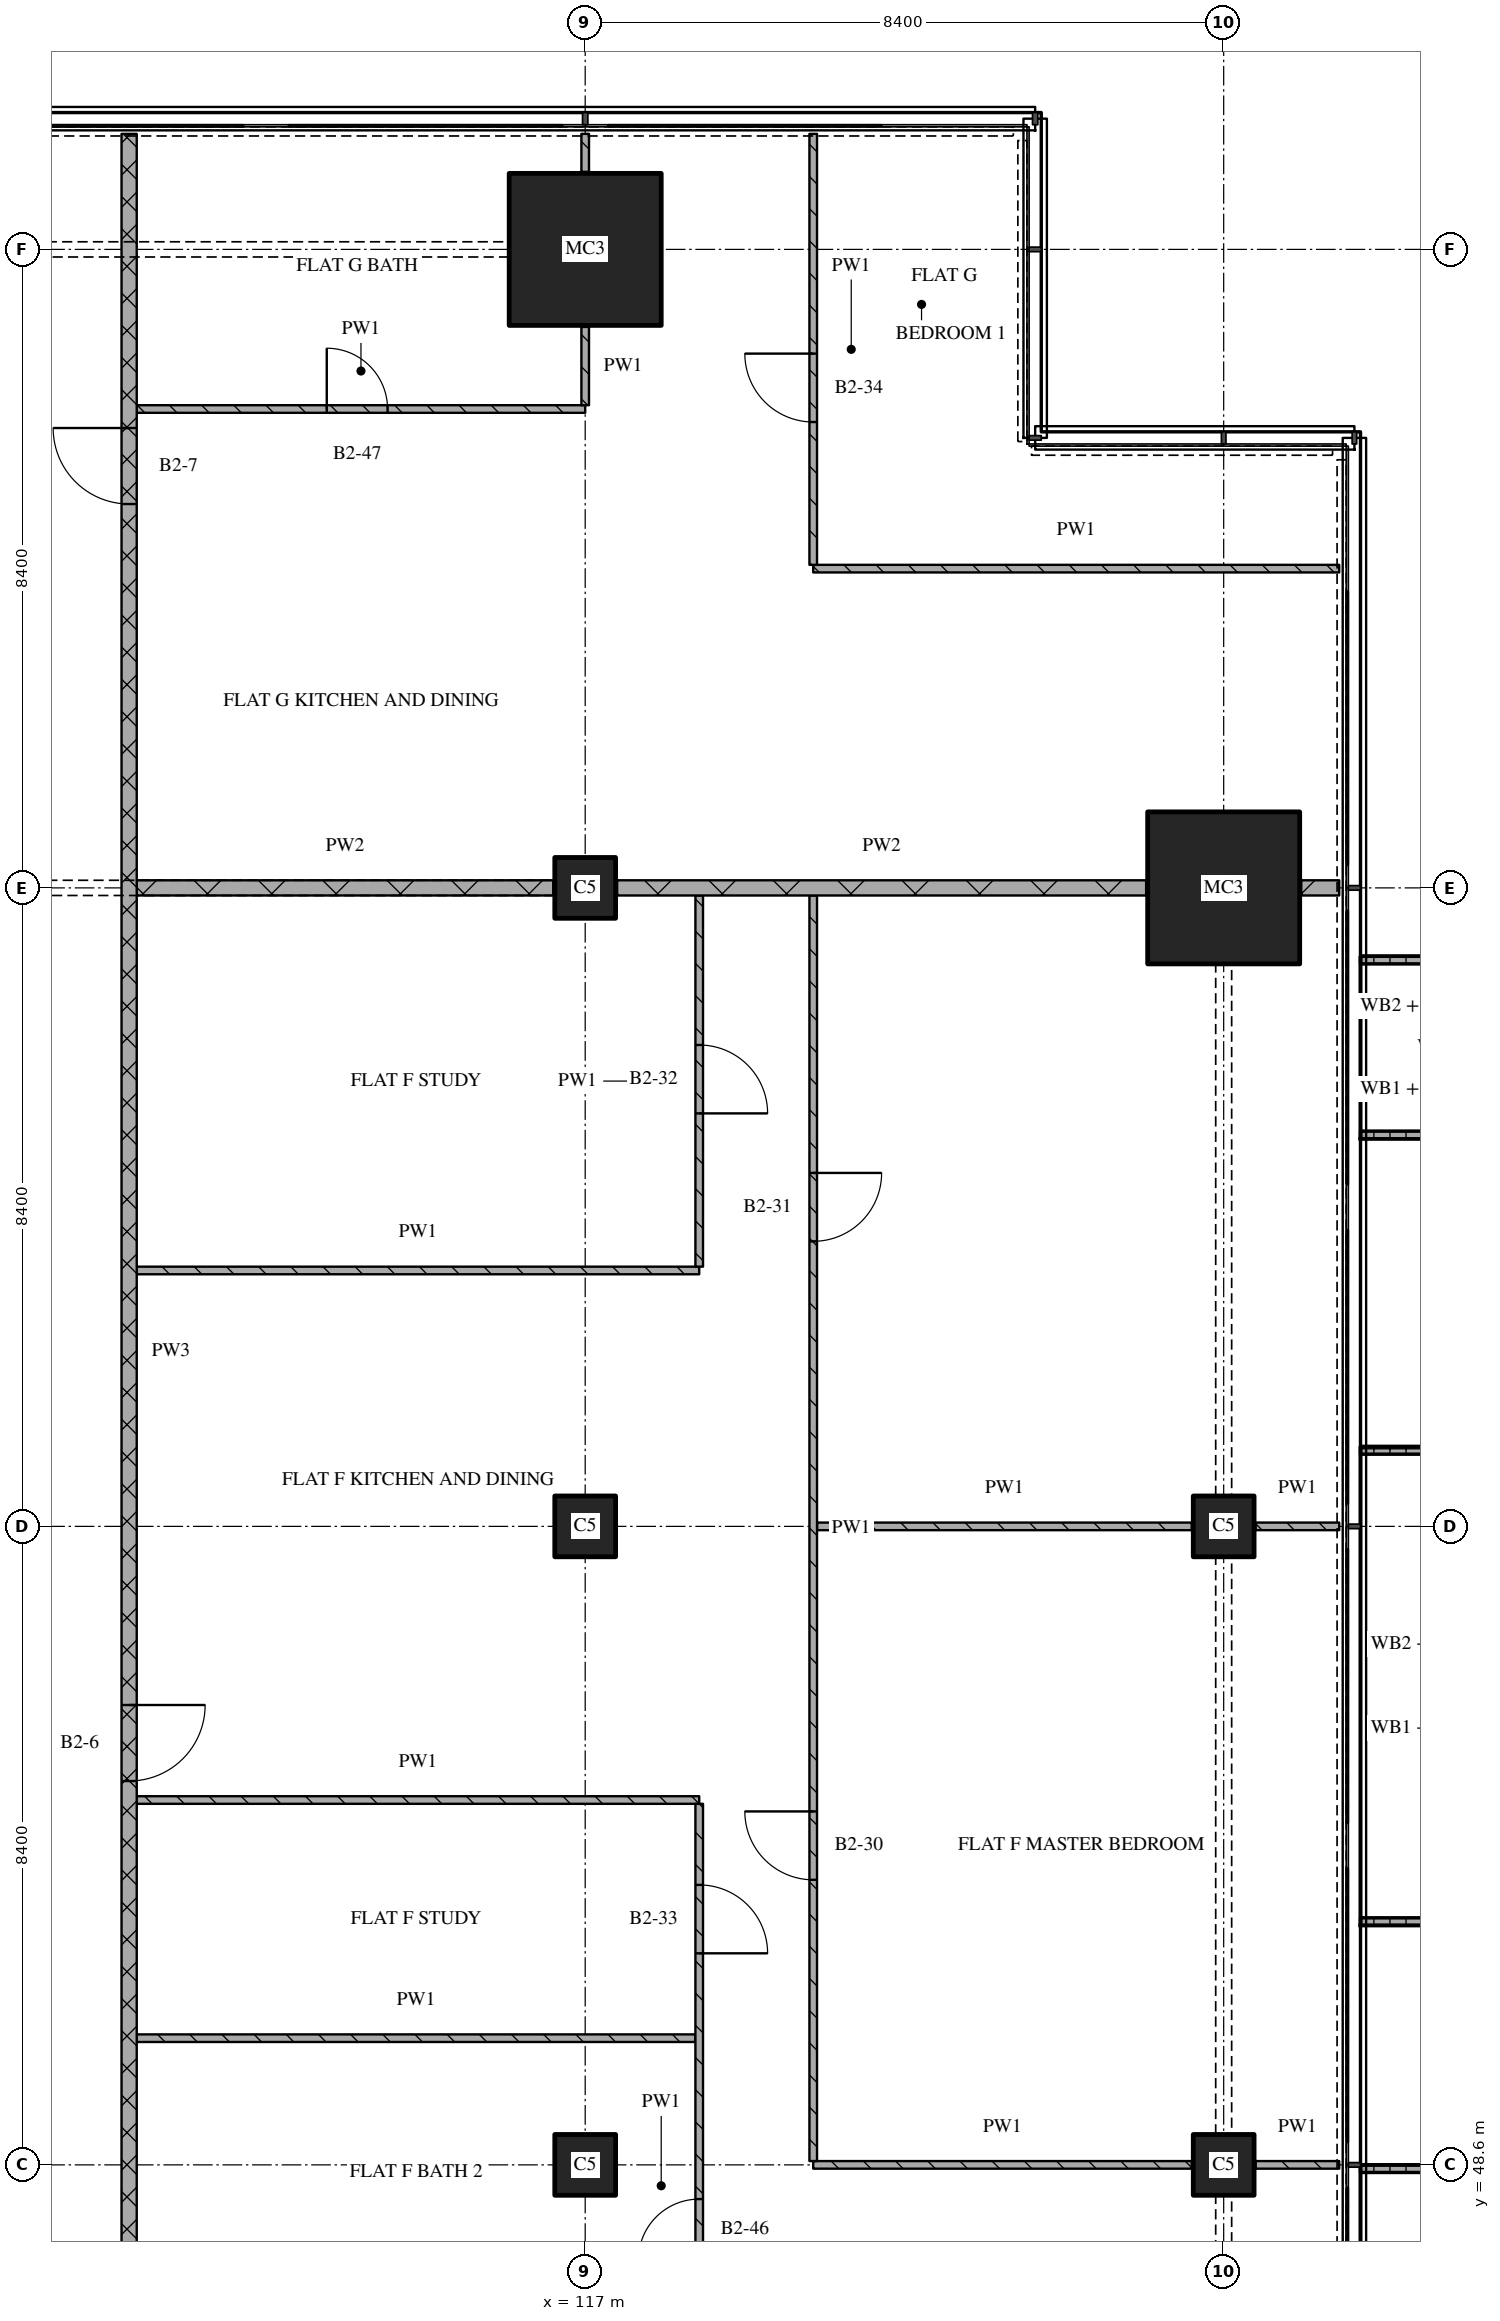
"""IFC4 building model, lengths in metres.
Left out: names, types, materials, properties, quantities, classifications, styles, units other than length and angle.
Written with IfcOpenShell. Run it as: python <this file> out.ifc"""

import sys

from ifc_helpers import new_model, si_unit, direction, frame, frame_2d, origin, origin_2d, place, context, subcontext, project, spatial, polyline, rectangle, outline, extrude, element, fill, save


model = new_model("IFC4")
c1 = context("Model", 3, precision=1e-05, world=origin(), true_north=direction((0.0, 1.0)))
c2 = subcontext(c1, "Body", "Model", "MODEL_VIEW")
j1 = project(units=[si_unit("LENGTHUNIT", "METRE"), si_unit("PLANEANGLEUNIT", "RADIAN")], contexts=[c1])
p1 = place(None, origin())
s1 = spatial("IfcSite", under=j1, at=p1, CompositionType="ELEMENT")
p2 = place(p1, origin())
s2 = spatial("IfcBuilding", under=s1, at=p2, CompositionType="ELEMENT")
p3 = place(p2, frame((0.0, 0.0, 106.05)))
s3 = spatial("IfcBuildingStorey", under=s2, at=p3, CompositionType="ELEMENT", Elevation=106.05)
for number, where, z_axis, x_axis in (
    (1, (117.0, 48.6, 0.0), (0.0, 0.0, 1.0), (1.0, 0.0, 0.0)),
    (2, (117.0, 57.0, 0.0), (0.0, 0.0, 1.0), (1.0, 0.0, 0.0)),
    (3, (117.0, 65.4, 0.0), (0.0, 0.0, 1.0), (1.0, 0.0, 0.0)),
):
    element("IfcColumn", number, at=place(p3, frame(where, z_axis=z_axis, x_axis=x_axis)), inside=s3, PredefinedType="COLUMN", context=c2, shape_type="SweptSolid", body=[
        extrude(rectangle(XDim=0.8, YDim=0.8, at=origin_2d()), origin(), (0.0, 0.0, 1.0), 3.6),
    ])
p4 = place(p3, frame((117.0, 73.8, 0.0), z_axis=(0.0, 0.0, 1.0), x_axis=(1.0, 0.0, 0.0)))
e4 = element("IfcColumn", 4, at=p4, inside=s3, PredefinedType="COLUMN", context=c2, shape_type="SweptSolid", body=[
    extrude(rectangle(XDim=2.0, YDim=2.0, at=origin_2d()), origin(), (0.0, 0.0, 1.0), 3.6),
])
for number, where, z_axis, x_axis in (
    (5, (125.4, 48.6, 0.0), (0.0, 0.0, 1.0), (1.0, 0.0, 0.0)),
    (6, (125.4, 57.0, 0.0), (0.0, 0.0, 1.0), (1.0, 0.0, 0.0)),
):
    element("IfcColumn", number, at=place(p3, frame(where, z_axis=z_axis, x_axis=x_axis)), inside=s3, PredefinedType="COLUMN", context=c2, shape_type="SweptSolid", body=[
        extrude(rectangle(XDim=0.8, YDim=0.8, at=origin_2d()), origin(), (0.0, 0.0, 1.0), 3.6),
    ])
p5 = place(p3, frame((125.4, 65.4, 0.0), z_axis=(0.0, 0.0, 1.0), x_axis=(1.0, 0.0, 0.0)))
e7 = element("IfcColumn", 7, at=p5, inside=s3, PredefinedType="COLUMN", context=c2, shape_type="SweptSolid", body=[
    extrude(rectangle(XDim=2.0, YDim=2.0, at=origin_2d()), origin(), (0.0, 0.0, 1.0), 3.6),
])
p6 = place(p3, origin())
e8 = element("IfcWall", 8, at=p6, inside=s3, PredefinedType="SOLIDWALL", context=c2, shape_type="SweptSolid", body=[
    extrude(outline(polyline([(127.2, 44.4), (127.2, 44.5), (128.833, 44.5), (128.833, 48.5), (127.2, 48.5), (127.2, 48.6), (128.933, 48.6), (128.933, 44.4), (127.2, 44.4)])), origin(), (0.0, 0.0, 1.0), 1.0),
])
p7 = place(p3, origin())
e9 = element("IfcWall", 9, at=p7, inside=s3, PredefinedType="SOLIDWALL", context=c2, shape_type="SweptSolid", body=[
    extrude(outline(polyline([(127.2, 51.75), (127.2, 51.85), (128.967, 51.85), (128.967, 57.95), (127.2, 57.95), (127.2, 58.05), (129.067, 58.05), (129.067, 51.75), (127.2, 51.75)])), origin(), (0.0, 0.0, 1.0), 1.0),
])
p8 = place(p3, origin())
e10 = element("IfcWall", 10, at=p8, inside=s3, PredefinedType="SOLIDWALL", context=c2, shape_type="SweptSolid", body=[
    extrude(outline(polyline([(127.2, 62.1), (127.2, 62.2), (128.7, 62.2), (128.7, 64.4), (127.2, 64.4), (127.2, 64.5), (128.8, 64.5), (128.8, 62.1), (127.2, 62.1)])), origin(), (0.0, 0.0, 1.0), 1.0),
])
p9 = place(p3, frame((120.0, 48.6, 0.0), z_axis=(0.0, 0.0, 1.0), x_axis=(1.0, 0.0, 0.0)))
e11 = element("IfcWall", 11, at=p9, inside=s3, PredefinedType="PARTITIONING", context=c2, shape_type="SweptSolid", body=[
    extrude(rectangle(XDim=4.98, YDim=0.1, at=frame_2d((2.49, 0.0))), origin(), (0.0, 0.0, 1.0), 3.32),
])
p10 = place(p3, frame((125.82, 48.6, 0.0), z_axis=(0.0, 0.0, 1.0), x_axis=(1.0, 0.0, 0.0)))
e12 = element("IfcWall", 12, at=p10, inside=s3, PredefinedType="PARTITIONING", context=c2, shape_type="SweptSolid", body=[
    extrude(rectangle(XDim=1.1, YDim=0.1, at=frame_2d((0.55, 0.0))), origin(), (0.0, 0.0, 1.0), 3.32),
])
p11 = place(p3, frame((111.1, 50.267, 0.0), z_axis=(0.0, 0.0, 1.0), x_axis=(1.0, 0.0, 0.0)))
e13 = element("IfcWall", 13, at=p11, inside=s3, PredefinedType="PARTITIONING", context=c2, shape_type="SweptSolid", body=[
    extrude(rectangle(XDim=7.35, YDim=0.1, at=frame_2d((3.675, 0.0))), origin(), (0.0, 0.0, 1.0), 3.32),
])
p12 = place(p3, frame((111.1, 53.4, 0.0), z_axis=(0.0, 0.0, 1.0), x_axis=(1.0, 0.0, 0.0)))
e14 = element("IfcWall", 14, at=p12, inside=s3, PredefinedType="PARTITIONING", context=c2, shape_type="SweptSolid", body=[
    extrude(rectangle(XDim=7.4, YDim=0.1, at=frame_2d((3.7, 0.0))), origin(), (0.0, 0.0, 1.0), 3.32),
])
p13 = place(p3, frame((120.05, 57.0, 0.0), z_axis=(0.0, 0.0, 1.0), x_axis=(1.0, 0.0, 0.0)))
e15 = element("IfcWall", 15, at=p13, inside=s3, PredefinedType="PARTITIONING", context=c2, shape_type="SweptSolid", body=[
    extrude(rectangle(XDim=4.93, YDim=0.1, at=frame_2d((2.465, 0.0))), origin(), (0.0, 0.0, 1.0), 3.32),
])
p14 = place(p3, frame((125.82, 57.0, 0.0), z_axis=(0.0, 0.0, 1.0), x_axis=(1.0, 0.0, 0.0)))
e16 = element("IfcWall", 16, at=p14, inside=s3, PredefinedType="PARTITIONING", context=c2, shape_type="SweptSolid", body=[
    extrude(rectangle(XDim=1.1, YDim=0.1, at=frame_2d((0.55, 0.0))), origin(), (0.0, 0.0, 1.0), 3.32),
])
p15 = place(p3, frame((111.1, 60.367, 0.0), z_axis=(0.0, 0.0, 1.0), x_axis=(1.0, 0.0, 0.0)))
e17 = element("IfcWall", 17, at=p15, inside=s3, PredefinedType="PARTITIONING", context=c2, shape_type="SweptSolid", body=[
    extrude(rectangle(XDim=7.4, YDim=0.1, at=frame_2d((3.7, 0.0))), origin(), (0.0, 0.0, 1.0), 3.32),
])
p16 = place(p3, frame((111.1, 65.4, 0.0), z_axis=(0.0, 0.0, 1.0), x_axis=(1.0, 0.0, 0.0)))
e18 = element("IfcWall", 18, at=p16, inside=s3, PredefinedType="PARTITIONING", context=c2, shape_type="SweptSolid", body=[
    extrude(rectangle(XDim=5.48, YDim=0.2, at=frame_2d((2.74, 0.0))), origin(), (0.0, 0.0, 1.0), 2.82),
])
p17 = place(p3, frame((117.42, 65.4, 0.0), z_axis=(0.0, 0.0, 1.0), x_axis=(1.0, 0.0, 0.0)))
e19 = element("IfcWall", 19, at=p17, inside=s3, PredefinedType="PARTITIONING", context=c2, shape_type="SweptSolid", body=[
    extrude(rectangle(XDim=6.96, YDim=0.2, at=frame_2d((3.48, 0.0))), origin(), (0.0, 0.0, 1.0), 3.32),
])
p18 = place(p3, frame((126.42, 65.4, 0.0), z_axis=(0.0, 0.0, 1.0), x_axis=(1.0, 0.0, 0.0)))
e20 = element("IfcWall", 20, at=p18, inside=s3, PredefinedType="PARTITIONING", context=c2, shape_type="SweptSolid", body=[
    extrude(rectangle(XDim=0.5, YDim=0.2, at=frame_2d((0.25, 0.0))), origin(), (0.0, 0.0, 1.0), 3.32),
])
p19 = place(p3, frame((120.0, 69.6, 0.0), z_axis=(0.0, 0.0, 1.0), x_axis=(1.0, 0.0, 0.0)))
e21 = element("IfcWall", 21, at=p19, inside=s3, PredefinedType="PARTITIONING", context=c2, shape_type="SweptSolid", body=[
    extrude(rectangle(XDim=6.92, YDim=0.1, at=frame_2d((3.46, 0.0))), origin(), (0.0, 0.0, 1.0), 3.32),
])
p20 = place(p3, frame((111.1, 71.7, 0.0), z_axis=(0.0, 0.0, 1.0), x_axis=(1.0, 0.0, 0.0)))
e22 = element("IfcWall", 22, at=p20, inside=s3, PredefinedType="PARTITIONING", context=c2, shape_type="SweptSolid", body=[
    extrude(rectangle(XDim=5.9, YDim=0.1, at=frame_2d((2.95, 0.0))), origin(), (0.0, 0.0, 1.0), 3.32),
])
p21 = place(p20, frame((2.5, 0.0, 0.0)))
e23 = element("IfcOpeningElement", 23, at=p21, cuts=e22, PredefinedType="OPENING", context=c2, shape_type="SweptSolid", body=[
    extrude(rectangle(XDim=0.8, YDim=2.1, at=frame_2d((0.4, 1.05))), frame((0.0, 0.06, 0.0), z_axis=(0.0, -1.0, 0.0), x_axis=(1.0, 0.0, 0.0)), (0.0, 0.0, 1.0), 0.12),
])
p22 = place(p3, frame((111.0, 75.32, 0.0), z_axis=(0.0, 0.0, 1.0), x_axis=(0.0, -1.0, 0.0)))
e24 = element("IfcWall", 24, at=p22, inside=s3, PredefinedType="PARTITIONING", context=c2, shape_type="SweptSolid", body=[
    extrude(rectangle(XDim=32.02, YDim=0.2, at=frame_2d((16.01, 0.0))), origin(), (0.0, 0.0, 1.0), 3.32),
])
p23 = place(p22, frame((3.87, 0.0, 0.0)))
e25 = element("IfcOpeningElement", 25, at=p23, cuts=e24, PredefinedType="OPENING", context=c2, shape_type="SweptSolid", body=[
    extrude(rectangle(XDim=1.0, YDim=2.1, at=frame_2d((0.5, 1.05))), frame((0.0, 0.11, 0.0), z_axis=(0.0, -1.0, 0.0), x_axis=(1.0, 0.0, 0.0)), (0.0, 0.0, 1.0), 0.22),
])
p24 = place(p22, frame((20.67, 0.0, 0.0)))
e26 = element("IfcOpeningElement", 26, at=p24, cuts=e24, PredefinedType="OPENING", context=c2, shape_type="SweptSolid", body=[
    extrude(rectangle(XDim=1.0, YDim=2.1, at=frame_2d((0.5, 1.05))), frame((0.0, 0.11, 0.0), z_axis=(0.0, -1.0, 0.0), x_axis=(1.0, 0.0, 0.0)), (0.0, 0.0, 1.0), 0.22),
])
p25 = place(p3, frame((117.0, 72.78, 0.0), z_axis=(0.0, 0.0, 1.0), x_axis=(0.0, -1.0, 0.0)))
e27 = element("IfcWall", 27, at=p25, inside=s3, PredefinedType="PARTITIONING", context=c2, shape_type="SweptSolid", body=[
    extrude(rectangle(XDim=1.03, YDim=0.1, at=frame_2d((0.515, 0.0))), origin(), (0.0, 0.0, 1.0), 3.32),
])
p26 = place(p3, frame((117.0, 75.32, 0.0), z_axis=(0.0, 0.0, 1.0), x_axis=(0.0, -1.0, 0.0)))
e28 = element("IfcWall", 28, at=p26, inside=s3, PredefinedType="PARTITIONING", context=c2, shape_type="SweptSolid", body=[
    extrude(rectangle(XDim=0.5, YDim=0.1, at=frame_2d((0.25, 0.0))), origin(), (0.0, 0.0, 1.0), 3.32),
])
p27 = place(p3, frame((118.5, 43.3, 0.0), z_axis=(0.0, 0.0, 1.0), x_axis=(0.0, 1.0, 0.0)))
e29 = element("IfcWall", 29, at=p27, inside=s3, PredefinedType="PARTITIONING", context=c2, shape_type="SweptSolid", body=[
    extrude(rectangle(XDim=10.05, YDim=0.1, at=frame_2d((5.025, 0.0))), origin(), (0.0, 0.0, 1.0), 3.32),
])
p28 = place(p27, frame((1.267, 0.0, 0.0)))
e30 = element("IfcOpeningElement", 30, at=p28, cuts=e29, PredefinedType="OPENING", context=c2, shape_type="SweptSolid", body=[
    extrude(rectangle(XDim=0.8, YDim=2.1, at=frame_2d((0.4, 1.05))), frame((0.0, 0.06, 0.0), z_axis=(0.0, -1.0, 0.0), x_axis=(1.0, 0.0, 0.0)), (0.0, 0.0, 1.0), 0.12),
])
p29 = place(p27, frame((4.05, 0.0, 0.0)))
e31 = element("IfcOpeningElement", 31, at=p29, cuts=e29, PredefinedType="OPENING", context=c2, shape_type="SweptSolid", body=[
    extrude(rectangle(XDim=0.8, YDim=2.1, at=frame_2d((0.4, 1.05))), frame((0.0, 0.06, 0.0), z_axis=(0.0, -1.0, 0.0), x_axis=(1.0, 0.0, 0.0)), (0.0, 0.0, 1.0), 0.12),
])
p30 = place(p27, frame((8.083, 0.0, 0.0)))
e32 = element("IfcOpeningElement", 32, at=p30, cuts=e29, PredefinedType="OPENING", context=c2, shape_type="SweptSolid", body=[
    extrude(rectangle(XDim=0.9, YDim=2.1, at=frame_2d((0.45, 1.05))), frame((0.0, 0.06, 0.0), z_axis=(0.0, -1.0, 0.0), x_axis=(1.0, 0.0, 0.0)), (0.0, 0.0, 1.0), 0.12),
])
p31 = place(p3, frame((118.5, 60.417, 0.0), z_axis=(0.0, 0.0, 1.0), x_axis=(0.0, 1.0, 0.0)))
e33 = element("IfcWall", 33, at=p31, inside=s3, PredefinedType="PARTITIONING", context=c2, shape_type="SweptSolid", body=[
    extrude(rectangle(XDim=4.883, YDim=0.1, at=frame_2d((2.442, 0.0))), origin(), (0.0, 0.0, 1.0), 3.32),
])
p32 = place(p31, frame((2.017, 0.0, 0.0)))
e34 = element("IfcOpeningElement", 34, at=p32, cuts=e33, PredefinedType="OPENING", context=c2, shape_type="SweptSolid", body=[
    extrude(rectangle(XDim=0.9, YDim=2.1, at=frame_2d((0.45, 1.05))), frame((0.0, 0.06, 0.0), z_axis=(0.0, -1.0, 0.0), x_axis=(1.0, 0.0, 0.0)), (0.0, 0.0, 1.0), 0.12),
])
p33 = place(p3, frame((120.0, 65.3, 0.0), z_axis=(0.0, 0.0, 1.0), x_axis=(0.0, -1.0, 0.0)))
e35 = element("IfcWall", 35, at=p33, inside=s3, PredefinedType="PARTITIONING", context=c2, shape_type="SweptSolid", body=[
    extrude(rectangle(XDim=16.65, YDim=0.1, at=frame_2d((8.325, 0.0))), origin(), (0.0, 0.0, 1.0), 3.32),
])
p34 = place(p33, frame((3.65, 0.0, 0.0)))
e36 = element("IfcOpeningElement", 36, at=p34, cuts=e35, PredefinedType="OPENING", context=c2, shape_type="SweptSolid", body=[
    extrude(rectangle(XDim=0.9, YDim=2.1, at=frame_2d((0.45, 1.05))), frame((0.0, 0.06, 0.0), z_axis=(0.0, -1.0, 0.0), x_axis=(1.0, 0.0, 0.0)), (0.0, 0.0, 1.0), 0.12),
])
p35 = place(p33, frame((12.05, 0.0, 0.0)))
e37 = element("IfcOpeningElement", 37, at=p35, cuts=e35, PredefinedType="OPENING", context=c2, shape_type="SweptSolid", body=[
    extrude(rectangle(XDim=0.9, YDim=2.1, at=frame_2d((0.45, 1.05))), frame((0.0, 0.06, 0.0), z_axis=(0.0, -1.0, 0.0), x_axis=(1.0, 0.0, 0.0)), (0.0, 0.0, 1.0), 0.12),
])
p36 = place(p3, frame((120.0, 75.32, 0.0), z_axis=(0.0, 0.0, 1.0), x_axis=(0.0, -1.0, 0.0)))
e38 = element("IfcWall", 38, at=p36, inside=s3, PredefinedType="PARTITIONING", context=c2, shape_type="SweptSolid", body=[
    extrude(rectangle(XDim=5.67, YDim=0.1, at=frame_2d((2.835, 0.0))), origin(), (0.0, 0.0, 1.0), 3.32),
])
p37 = place(p36, frame((2.891, 0.0, 0.0)))
e39 = element("IfcOpeningElement", 39, at=p37, cuts=e38, PredefinedType="OPENING", context=c2, shape_type="SweptSolid", body=[
    extrude(rectangle(XDim=0.9, YDim=2.1, at=frame_2d((0.45, 1.05))), frame((0.0, 0.06, 0.0), z_axis=(0.0, -1.0, 0.0), x_axis=(1.0, 0.0, 0.0)), (0.0, 0.0, 1.0), 0.12),
])
p38 = place(p21, origin())
e40 = element("IfcDoor", 40, at=p38, inside=s3, OperationType="SINGLE_SWING_LEFT", PredefinedType="DOOR", context=c2, shape_type="SweptSolid", body=[
    extrude(rectangle(XDim=0.8, YDim=2.1, at=frame_2d((0.4, 1.05))), frame((0.0, 0.025, 0.0), z_axis=(0.0, -1.0, 0.0), x_axis=(1.0, 0.0, 0.0)), (0.0, 0.0, 1.0), 0.05),
])
fill(e23, e40)
p39 = place(p23, origin())
e41 = element("IfcDoor", 41, at=p39, inside=s3, OperationType="SINGLE_SWING_RIGHT", PredefinedType="DOOR", context=c2, shape_type="SweptSolid", body=[
    extrude(rectangle(XDim=1.0, YDim=2.1, at=frame_2d((0.5, 1.05))), frame((0.0, 0.025, 0.0), z_axis=(0.0, -1.0, 0.0), x_axis=(1.0, 0.0, 0.0)), (0.0, 0.0, 1.0), 0.05),
])
fill(e25, e41)
p40 = place(p24, origin())
e42 = element("IfcDoor", 42, at=p40, inside=s3, OperationType="SINGLE_SWING_LEFT", PredefinedType="DOOR", context=c2, shape_type="SweptSolid", body=[
    extrude(rectangle(XDim=1.0, YDim=2.1, at=frame_2d((0.5, 1.05))), frame((0.0, 0.025, 0.0), z_axis=(0.0, -1.0, 0.0), x_axis=(1.0, 0.0, 0.0)), (0.0, 0.0, 1.0), 0.05),
])
fill(e26, e42)
p41 = place(p29, origin())
e43 = element("IfcDoor", 43, at=p41, inside=s3, OperationType="SINGLE_SWING_LEFT", PredefinedType="DOOR", context=c2, shape_type="SweptSolid", body=[
    extrude(rectangle(XDim=0.8, YDim=2.1, at=frame_2d((0.4, 1.05))), frame((0.0, 0.025, 0.0), z_axis=(0.0, -1.0, 0.0), x_axis=(1.0, 0.0, 0.0)), (0.0, 0.0, 1.0), 0.05),
])
fill(e31, e43)
p42 = place(p30, origin())
e44 = element("IfcDoor", 44, at=p42, inside=s3, OperationType="SINGLE_SWING_RIGHT", PredefinedType="DOOR", context=c2, shape_type="SweptSolid", body=[
    extrude(rectangle(XDim=0.9, YDim=2.1, at=frame_2d((0.45, 1.05))), frame((0.0, 0.025, 0.0), z_axis=(0.0, -1.0, 0.0), x_axis=(1.0, 0.0, 0.0)), (0.0, 0.0, 1.0), 0.05),
])
fill(e32, e44)
p43 = place(p32, origin())
e45 = element("IfcDoor", 45, at=p43, inside=s3, OperationType="SINGLE_SWING_RIGHT", PredefinedType="DOOR", context=c2, shape_type="SweptSolid", body=[
    extrude(rectangle(XDim=0.9, YDim=2.1, at=frame_2d((0.45, 1.05))), frame((0.0, 0.025, 0.0), z_axis=(0.0, -1.0, 0.0), x_axis=(1.0, 0.0, 0.0)), (0.0, 0.0, 1.0), 0.05),
])
fill(e34, e45)
p44 = place(p34, origin())
e46 = element("IfcDoor", 46, at=p44, inside=s3, OperationType="SINGLE_SWING_LEFT", PredefinedType="DOOR", context=c2, shape_type="SweptSolid", body=[
    extrude(rectangle(XDim=0.9, YDim=2.1, at=frame_2d((0.45, 1.05))), frame((0.0, 0.025, 0.0), z_axis=(0.0, -1.0, 0.0), x_axis=(1.0, 0.0, 0.0)), (0.0, 0.0, 1.0), 0.05),
])
fill(e36, e46)
p45 = place(p35, origin())
e47 = element("IfcDoor", 47, at=p45, inside=s3, OperationType="SINGLE_SWING_RIGHT", PredefinedType="DOOR", context=c2, shape_type="SweptSolid", body=[
    extrude(rectangle(XDim=0.9, YDim=2.1, at=frame_2d((0.45, 1.05))), frame((0.0, 0.025, 0.0), z_axis=(0.0, -1.0, 0.0), x_axis=(1.0, 0.0, 0.0)), (0.0, 0.0, 1.0), 0.05),
])
fill(e37, e47)
p46 = place(p37, origin())
e48 = element("IfcDoor", 48, at=p46, inside=s3, OperationType="SINGLE_SWING_RIGHT", PredefinedType="DOOR", context=c2, shape_type="SweptSolid", body=[
    extrude(rectangle(XDim=0.9, YDim=2.1, at=frame_2d((0.45, 1.05))), frame((0.0, 0.025, 0.0), z_axis=(0.0, -1.0, 0.0), x_axis=(1.0, 0.0, 0.0)), (0.0, 0.0, 1.0), 0.05),
])
fill(e39, e48)
save(model, sys.argv[1])
